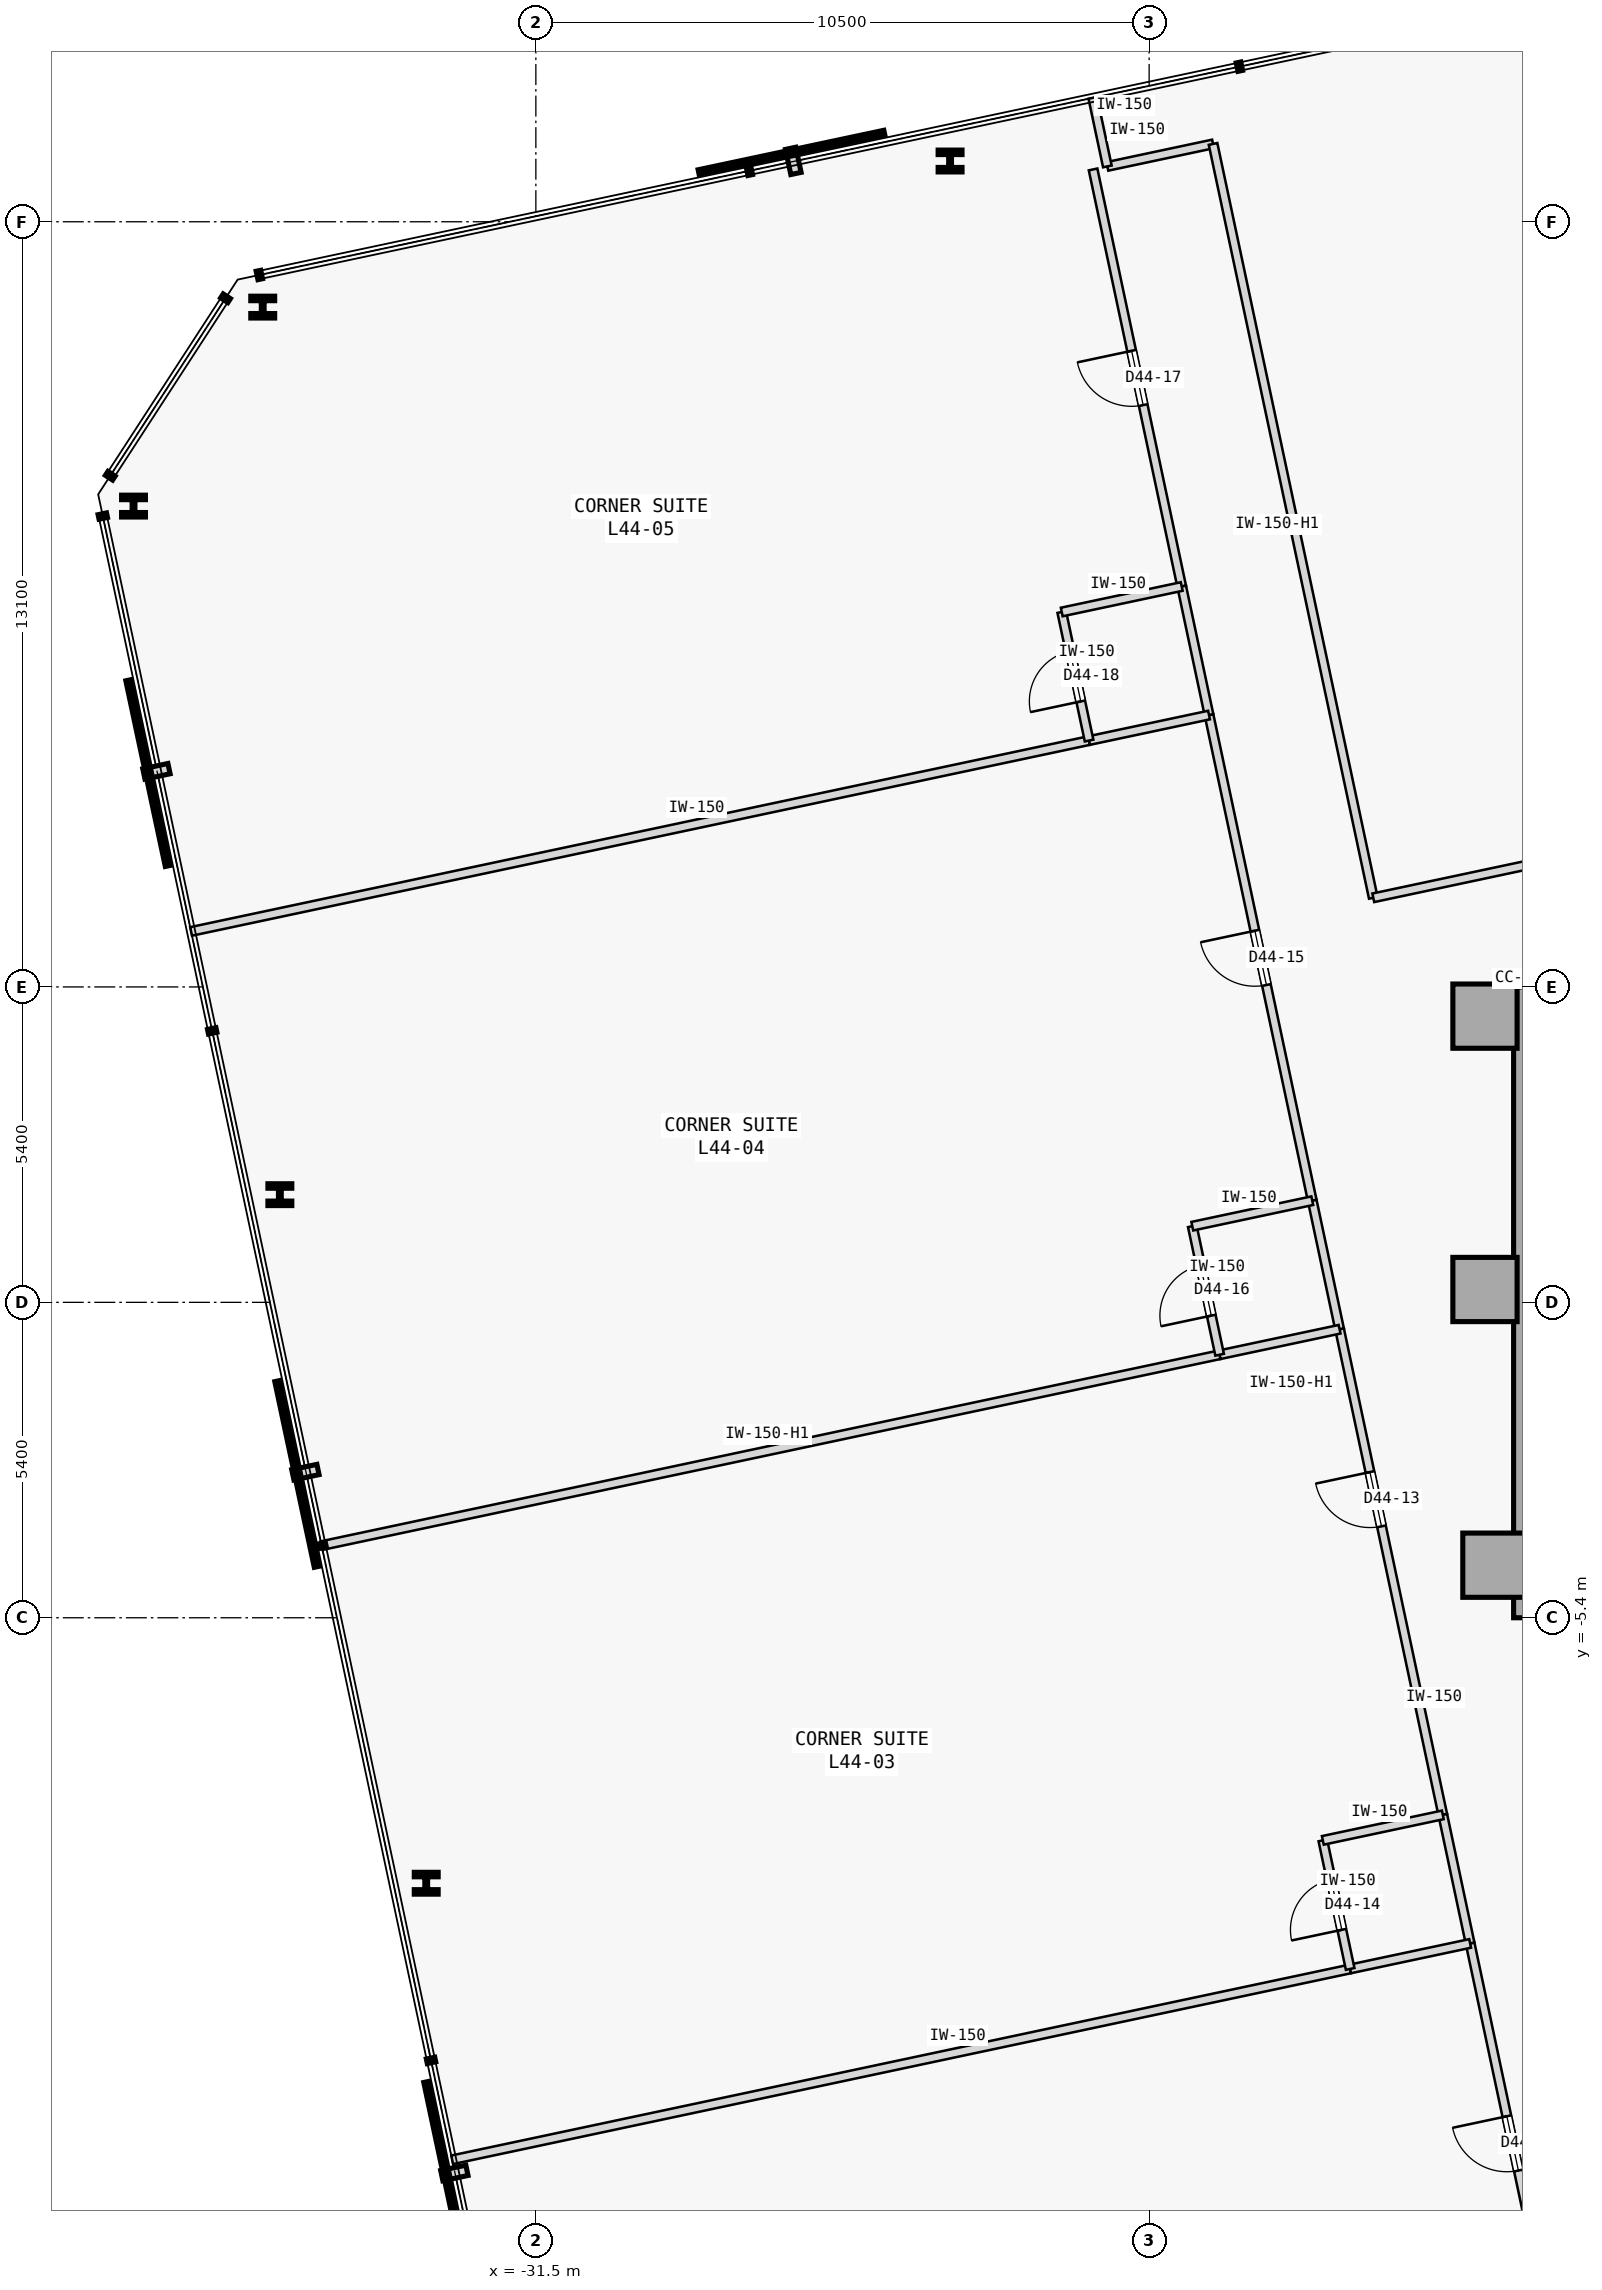
"""IFC4 building model, lengths in metres.
Left out: names, types, materials, properties, quantities, classifications, styles, units other than length and angle.
Written with IfcOpenShell. Run it as: python <this file> out.ifc"""

import sys

from ifc_helpers import new_model, si_unit, direction, frame, frame_2d, origin, origin_2d, place, context, subcontext, project, spatial, rectangle, i_section, extrude, element, fill, save


model = new_model("IFC4")
c1 = context("Model", 3, precision=1e-05, world=origin(), true_north=direction((0.0, 1.0)))
c2 = subcontext(c1, "Body", "Model", "MODEL_VIEW")
j1 = project(units=[si_unit("LENGTHUNIT", "METRE"), si_unit("PLANEANGLEUNIT", "RADIAN")], contexts=[c1])
p1 = place(None, origin())
s1 = spatial("IfcSite", under=j1, at=p1, CompositionType="ELEMENT")
p2 = place(p1, origin())
s2 = spatial("IfcBuilding", under=s1, at=p2, CompositionType="ELEMENT")
p3 = place(p2, frame((0.0, 0.0, 171.8)))
s3 = spatial("IfcBuildingStorey", under=s2, at=p3, CompositionType="ELEMENT", Elevation=171.8)
for number, where, z_axis, x_axis in (
    (1, (-15.25, 4.9, 0.0), (0.0, 0.0, 1.0), (1.0, 0.0, 0.0)),
    (2, (-15.25, 0.22, 0.0), (0.0, 0.0, 1.0), (1.0, 0.0, 0.0)),
    (3, (-15.08, -4.5, 0.0), (0.0, 0.0, 1.0), (1.0, 0.0, 0.0)),
):
    element("IfcColumn", number, at=place(p3, frame(where, z_axis=z_axis, x_axis=x_axis)), inside=s3, PredefinedType="COLUMN", context=c2, shape_type="SweptSolid", body=[
        extrude(rectangle(XDim=1.1, YDim=1.1, at=origin_2d()), origin(), (0.0, 0.0, 1.0), 3.4),
    ])
p4 = place(p3, frame((-14.56, -5.4, 0.0), z_axis=(0.0, 0.0, 1.0), x_axis=(0.0, 1.0, 0.0)))
e4 = element("IfcWall", 4, at=p4, inside=s3, PredefinedType="SHEAR", context=c2, shape_type="SweptSolid", body=[
    extrude(rectangle(XDim=10.8, YDim=0.4, at=frame_2d((5.4, 0.0))), origin(), (0.0, 0.0, 1.0), 3.175),
])
for number, where, z_axis, x_axis in (
    (5, (-24.408, 19.54, 0.0), (0.0, 0.0, 1.0), (1.0, 0.0, 0.0)),
    (6, (-36.176, 17.039, 0.0), (0.0, 0.0, 1.0), (1.0, 0.0, 0.0)),
    (7, (-38.389, 13.632, 0.0), (0.0, 0.0, 1.0), (1.0, 0.0, 0.0)),
    (8, (-35.883, 1.844, 0.0), (0.0, 0.0, 1.0), (1.0, 0.0, 0.0)),
    (9, (-33.377, -9.945, 0.0), (0.0, 0.0, 1.0), (1.0, 0.0, 0.0)),
):
    element("IfcColumn", number, at=place(p3, frame(where, z_axis=z_axis, x_axis=x_axis)), inside=s3, PredefinedType="COLUMN", context=c2, shape_type="SweptSolid", body=[
        extrude(i_section(OverallWidth=0.409, OverallDepth=0.374, WebThickness=0.048, FlangeThickness=0.077, FilletRadius=0.015, at=origin_2d()), origin(), (0.0, 0.0, 1.0), 3.4),
    ])
p5 = place(p3, frame((-21.715, 19.448, 0.0), z_axis=(0.0, 0.0, 1.0), x_axis=(0.978160192495, 0.207852442415, 0.0)))
e10 = element("IfcWall", 10, at=p5, inside=s3, PredefinedType="PARTITIONING", context=c2, shape_type="SweptSolid", body=[
    extrude(rectangle(XDim=1.85, YDim=0.15, at=frame_2d((0.925, 0.0))), origin(), (0.0, 0.0, 1.0), 3.175),
])
p6 = place(p3, frame((-17.162, 6.926, 0.0), z_axis=(0.0, 0.0, 1.0), x_axis=(-0.207911421929, 0.978147657888, 0.0)))
e11 = element("IfcWall", 11, at=p6, inside=s3, PredefinedType="PARTITIONING", context=c2, shape_type="SweptSolid", body=[
    extrude(rectangle(XDim=13.195, YDim=0.15, at=frame_2d((6.598, 0.0))), origin(), (0.0, 0.0, 1.0), 2.725),
])
p7 = place(p3, frame((-17.162, 6.926, 0.0), z_axis=(0.0, 0.0, 1.0), x_axis=(0.978145870853, 0.207919829103, 0.0)))
e12 = element("IfcWall", 12, at=p7, inside=s3, PredefinedType="PARTITIONING", context=c2, shape_type="SweptSolid", body=[
    extrude(rectangle(XDim=15.347, YDim=0.15, at=frame_2d((7.673, 0.0))), origin(), (0.0, 0.0, 1.0), 3.175),
])
p8 = place(p7, frame((7.213, 0.0, 0.0)))
e13 = element("IfcOpeningElement", 13, at=p8, cuts=e12, PredefinedType="OPENING", context=c2, shape_type="SweptSolid", body=[
    extrude(rectangle(XDim=0.92, YDim=2.15, at=frame_2d((0.46, 1.075))), frame((0.0, 0.085, 0.0), z_axis=(0.0, -1.0, 0.0), x_axis=(1.0, 0.0, 0.0)), (0.0, 0.0, 1.0), 0.17),
])
p9 = place(p3, frame((-14.049, -17.823, 0.0), z_axis=(0.0, 0.0, 1.0), x_axis=(-0.207940096132, 0.978141562567, 0.0)))
e14 = element("IfcWall", 14, at=p9, inside=s3, PredefinedType="PARTITIONING", context=c2, shape_type="SweptSolid", body=[
    extrude(rectangle(XDim=7.0, YDim=0.15, at=frame_2d((3.5, 0.0))), origin(), (0.0, 0.0, 1.0), 3.175),
])
p10 = place(p9, frame((3.025, 0.0, 0.0)))
e15 = element("IfcOpeningElement", 15, at=p10, cuts=e14, PredefinedType="OPENING", context=c2, shape_type="SweptSolid", body=[
    extrude(rectangle(XDim=0.95, YDim=2.15, at=frame_2d((0.475, 1.075))), frame((0.0, 0.085, 0.0), z_axis=(0.0, -1.0, 0.0), x_axis=(1.0, 0.0, 0.0)), (0.0, 0.0, 1.0), 0.17),
])
p11 = place(p3, frame((-15.972, -8.775, 0.0), z_axis=(0.0, 0.0, 1.0), x_axis=(-0.207894825434, 0.97815118543, 0.0)))
e16 = element("IfcWall", 16, at=p11, inside=s3, PredefinedType="PARTITIONING", context=c2, shape_type="SweptSolid", body=[
    extrude(rectangle(XDim=8.5, YDim=0.15, at=frame_2d((4.25, 0.0))), origin(), (0.0, 0.0, 1.0), 3.175),
])
p12 = place(p11, frame((5.05, 0.0, 0.0)))
e17 = element("IfcOpeningElement", 17, at=p12, cuts=e16, PredefinedType="OPENING", context=c2, shape_type="SweptSolid", body=[
    extrude(rectangle(XDim=0.95, YDim=2.15, at=frame_2d((0.475, 1.075))), frame((0.0, 0.085, 0.0), z_axis=(0.0, -1.0, 0.0), x_axis=(1.0, 0.0, 0.0)), (0.0, 0.0, 1.0), 0.17),
])
p13 = place(p3, frame((-15.504, -10.976, 0.0), z_axis=(0.0, 0.0, 1.0), x_axis=(-0.207891197838, 0.978151956427, 0.0)))
e18 = element("IfcWall", 18, at=p13, inside=s3, PredefinedType="PARTITIONING", context=c2, shape_type="SweptSolid", body=[
    extrude(rectangle(XDim=2.25, YDim=0.15, at=frame_2d((1.125, 0.0))), origin(), (0.0, 0.0, 1.0), 3.175),
])
p14 = place(p3, frame((-18.207, 1.74, 0.0), z_axis=(0.0, 0.0, 1.0), x_axis=(-0.207922306475, 0.978145344246, 0.0)))
e19 = element("IfcWall", 19, at=p14, inside=s3, PredefinedType="PARTITIONING", context=c2, shape_type="SweptSolid", body=[
    extrude(rectangle(XDim=8.5, YDim=0.15, at=frame_2d((4.25, 0.0))), origin(), (0.0, 0.0, 1.0), 3.175),
])
p15 = place(p14, frame((3.775, 0.0, 0.0)))
e20 = element("IfcOpeningElement", 20, at=p15, cuts=e19, PredefinedType="OPENING", context=c2, shape_type="SweptSolid", body=[
    extrude(rectangle(XDim=0.95, YDim=2.15, at=frame_2d((0.475, 1.075))), frame((0.0, 0.085, 0.0), z_axis=(0.0, -1.0, 0.0), x_axis=(1.0, 0.0, 0.0)), (0.0, 0.0, 1.0), 0.17),
])
p16 = place(p3, frame((-17.739, -0.46, 0.0), z_axis=(0.0, 0.0, 1.0), x_axis=(-0.207891197838, 0.978151956427, 0.0)))
e21 = element("IfcWall", 21, at=p16, inside=s3, PredefinedType="PARTITIONING", context=c2, shape_type="SweptSolid", body=[
    extrude(rectangle(XDim=2.25, YDim=0.15, at=frame_2d((1.125, 0.0))), origin(), (0.0, 0.0, 1.0), 3.175),
])
p17 = place(p3, frame((-20.442, 12.255, 0.0), z_axis=(0.0, 0.0, 1.0), x_axis=(-0.207916352354, 0.978146609882, 0.0)))
e22 = element("IfcWall", 22, at=p17, inside=s3, PredefinedType="PARTITIONING", context=c2, shape_type="SweptSolid", body=[
    extrude(rectangle(XDim=7.3, YDim=0.15, at=frame_2d((3.65, 0.0))), origin(), (0.0, 0.0, 1.0), 3.175),
])
p18 = place(p17, frame((3.175, 0.0, 0.0)))
e23 = element("IfcOpeningElement", 23, at=p18, cuts=e22, PredefinedType="OPENING", context=c2, shape_type="SweptSolid", body=[
    extrude(rectangle(XDim=0.95, YDim=2.15, at=frame_2d((0.475, 1.075))), frame((0.0, 0.085, 0.0), z_axis=(0.0, -1.0, 0.0), x_axis=(1.0, 0.0, 0.0)), (0.0, 0.0, 1.0), 0.17),
])
p19 = place(p3, frame((-19.974, 10.055, 0.0), z_axis=(0.0, 0.0, 1.0), x_axis=(-0.207913264065, 0.978147266328, 0.0)))
e24 = element("IfcWall", 24, at=p19, inside=s3, PredefinedType="PARTITIONING", context=c2, shape_type="SweptSolid", body=[
    extrude(rectangle(XDim=2.25, YDim=0.15, at=frame_2d((1.125, 0.0))), origin(), (0.0, 0.0, 1.0), 3.175),
])
p20 = place(p3, frame((-21.715, 19.448, 0.0), z_axis=(0.0, 0.0, 1.0), x_axis=(-0.20795853359, 0.978137642823, 0.0)))
e25 = element("IfcWall", 25, at=p20, inside=s3, PredefinedType="PARTITIONING", context=c2, shape_type="SweptSolid", body=[
    extrude(rectangle(XDim=1.2, YDim=0.15, at=frame_2d((0.6, 0.0))), origin(), (0.0, 0.0, 1.0), 3.175),
])
p21 = place(p3, frame((-32.933, -14.68, 0.0), z_axis=(0.0, 0.0, 1.0), x_axis=(0.978146137903, 0.207918572776, 0.0)))
e26 = element("IfcWall", 26, at=p21, inside=s3, PredefinedType="PARTITIONING", context=c2, shape_type="SweptSolid", body=[
    extrude(rectangle(XDim=15.718, YDim=0.15, at=frame_2d((7.859, 0.0))), origin(), (0.0, 0.0, 1.0), 3.175),
])
p22 = place(p3, frame((-17.558, -11.412, 0.0), z_axis=(0.0, 0.0, 1.0), x_axis=(0.978153236239, 0.207885176084, 0.0)))
e27 = element("IfcWall", 27, at=p22, inside=s3, PredefinedType="PARTITIONING", context=c2, shape_type="SweptSolid", body=[
    extrude(rectangle(XDim=2.1, YDim=0.15, at=frame_2d((1.05, 0.0))), origin(), (0.0, 0.0, 1.0), 3.175),
])
p23 = place(p3, frame((-17.558, -11.412, 0.0), z_axis=(0.0, 0.0, 1.0), x_axis=(-0.207891197838, 0.978151956427, 0.0)))
e28 = element("IfcWall", 28, at=p23, inside=s3, PredefinedType="PARTITIONING", context=c2, shape_type="SweptSolid", body=[
    extrude(rectangle(XDim=2.25, YDim=0.15, at=frame_2d((1.125, 0.0))), origin(), (0.0, 0.0, 1.0), 3.175),
])
p24 = place(p23, frame((0.685, 0.0, 0.0)))
e29 = element("IfcOpeningElement", 29, at=p24, cuts=e28, PredefinedType="OPENING", context=c2, shape_type="SweptSolid", body=[
    extrude(rectangle(XDim=0.88, YDim=2.15, at=frame_2d((0.44, 1.075))), frame((0.0, 0.085, 0.0), z_axis=(0.0, -1.0, 0.0), x_axis=(1.0, 0.0, 0.0)), (0.0, 0.0, 1.0), 0.17),
])
p25 = place(p3, frame((-18.026, -9.211, 0.0), z_axis=(0.0, 0.0, 1.0), x_axis=(0.978153236239, 0.207885176084, 0.0)))
e30 = element("IfcWall", 30, at=p25, inside=s3, PredefinedType="PARTITIONING", context=c2, shape_type="SweptSolid", body=[
    extrude(rectangle(XDim=2.1, YDim=0.15, at=frame_2d((1.05, 0.0))), origin(), (0.0, 0.0, 1.0), 3.175),
])
p26 = place(p3, frame((-35.168, -4.165, 0.0), z_axis=(0.0, 0.0, 1.0), x_axis=(0.978149296727, 0.207903711638, 0.0)))
e31 = element("IfcWall", 31, at=p26, inside=s3, PredefinedType="PARTITIONING", context=c2, shape_type="SweptSolid", body=[
    extrude(rectangle(XDim=15.718, YDim=0.15, at=frame_2d((7.859, 0.0))), origin(), (0.0, 0.0, 1.0), 2.725),
])
p27 = place(p3, frame((-19.793, -0.897, 0.0), z_axis=(0.0, 0.0, 1.0), x_axis=(0.978134617382, 0.207972763311, 0.0)))
e32 = element("IfcWall", 32, at=p27, inside=s3, PredefinedType="PARTITIONING", context=c2, shape_type="SweptSolid", body=[
    extrude(rectangle(XDim=2.1, YDim=0.15, at=frame_2d((1.05, 0.0))), origin(), (0.0, 0.0, 1.0), 2.725),
])
p28 = place(p3, frame((-19.793, -0.897, 0.0), z_axis=(0.0, 0.0, 1.0), x_axis=(-0.207891197838, 0.978151956427, 0.0)))
e33 = element("IfcWall", 33, at=p28, inside=s3, PredefinedType="PARTITIONING", context=c2, shape_type="SweptSolid", body=[
    extrude(rectangle(XDim=2.25, YDim=0.15, at=frame_2d((1.125, 0.0))), origin(), (0.0, 0.0, 1.0), 3.175),
])
p29 = place(p28, frame((0.685, 0.0, 0.0)))
e34 = element("IfcOpeningElement", 34, at=p29, cuts=e33, PredefinedType="OPENING", context=c2, shape_type="SweptSolid", body=[
    extrude(rectangle(XDim=0.88, YDim=2.15, at=frame_2d((0.44, 1.075))), frame((0.0, 0.085, 0.0), z_axis=(0.0, -1.0, 0.0), x_axis=(1.0, 0.0, 0.0)), (0.0, 0.0, 1.0), 0.17),
])
p30 = place(p3, frame((-20.261, 1.304, 0.0), z_axis=(0.0, 0.0, 1.0), x_axis=(0.978134617382, 0.207972763311, 0.0)))
e35 = element("IfcWall", 35, at=p30, inside=s3, PredefinedType="PARTITIONING", context=c2, shape_type="SweptSolid", body=[
    extrude(rectangle(XDim=2.1, YDim=0.15, at=frame_2d((1.05, 0.0))), origin(), (0.0, 0.0, 1.0), 3.175),
])
p31 = place(p3, frame((-37.403, 6.35, 0.0), z_axis=(0.0, 0.0, 1.0), x_axis=(0.978149296727, 0.207903711638, 0.0)))
e36 = element("IfcWall", 36, at=p31, inside=s3, PredefinedType="PARTITIONING", context=c2, shape_type="SweptSolid", body=[
    extrude(rectangle(XDim=15.718, YDim=0.15, at=frame_2d((7.859, 0.0))), origin(), (0.0, 0.0, 1.0), 3.175),
])
p32 = place(p3, frame((-22.029, 9.618, 0.0), z_axis=(0.0, 0.0, 1.0), x_axis=(0.978134617382, 0.207972763311, 0.0)))
e37 = element("IfcWall", 37, at=p32, inside=s3, PredefinedType="PARTITIONING", context=c2, shape_type="SweptSolid", body=[
    extrude(rectangle(XDim=2.1, YDim=0.15, at=frame_2d((1.05, 0.0))), origin(), (0.0, 0.0, 1.0), 3.175),
])
p33 = place(p3, frame((-22.029, 9.618, 0.0), z_axis=(0.0, 0.0, 1.0), x_axis=(-0.207891197838, 0.978151956427, 0.0)))
e38 = element("IfcWall", 38, at=p33, inside=s3, PredefinedType="PARTITIONING", context=c2, shape_type="SweptSolid", body=[
    extrude(rectangle(XDim=2.25, YDim=0.15, at=frame_2d((1.125, 0.0))), origin(), (0.0, 0.0, 1.0), 3.175),
])
p34 = place(p33, frame((0.685, 0.0, 0.0)))
e39 = element("IfcOpeningElement", 39, at=p34, cuts=e38, PredefinedType="OPENING", context=c2, shape_type="SweptSolid", body=[
    extrude(rectangle(XDim=0.88, YDim=2.15, at=frame_2d((0.44, 1.075))), frame((0.0, 0.085, 0.0), z_axis=(0.0, -1.0, 0.0), x_axis=(1.0, 0.0, 0.0)), (0.0, 0.0, 1.0), 0.17),
])
p35 = place(p3, frame((-22.496, 11.819, 0.0), z_axis=(0.0, 0.0, 1.0), x_axis=(0.97815826, 0.207861536591, 0.0)))
e40 = element("IfcWall", 40, at=p35, inside=s3, PredefinedType="PARTITIONING", context=c2, shape_type="SweptSolid", body=[
    extrude(rectangle(XDim=2.1, YDim=0.15, at=frame_2d((1.05, 0.0))), origin(), (0.0, 0.0, 1.0), 3.175),
])
p36 = place(p10, origin())
e41 = element("IfcDoor", 41, at=p36, inside=s3, OperationType="SINGLE_SWING_RIGHT", PredefinedType="DOOR", context=c2, shape_type="SweptSolid", body=[
    extrude(rectangle(XDim=0.95, YDim=2.15, at=frame_2d((0.475, 1.075))), frame((0.0, 0.025, 0.0), z_axis=(0.0, -1.0, 0.0), x_axis=(1.0, 0.0, 0.0)), (0.0, 0.0, 1.0), 0.05),
])
fill(e15, e41)
p37 = place(p12, origin())
e42 = element("IfcDoor", 42, at=p37, inside=s3, OperationType="SINGLE_SWING_RIGHT", PredefinedType="DOOR", context=c2, shape_type="SweptSolid", body=[
    extrude(rectangle(XDim=0.95, YDim=2.15, at=frame_2d((0.475, 1.075))), frame((0.0, 0.025, 0.0), z_axis=(0.0, -1.0, 0.0), x_axis=(1.0, 0.0, 0.0)), (0.0, 0.0, 1.0), 0.05),
])
fill(e17, e42)
p38 = place(p24, origin())
e43 = element("IfcDoor", 43, at=p38, inside=s3, OperationType="SINGLE_SWING_LEFT", PredefinedType="DOOR", context=c2, shape_type="SweptSolid", body=[
    extrude(rectangle(XDim=0.88, YDim=2.15, at=frame_2d((0.44, 1.075))), frame((0.0, 0.025, 0.0), z_axis=(0.0, -1.0, 0.0), x_axis=(1.0, 0.0, 0.0)), (0.0, 0.0, 1.0), 0.05),
])
fill(e29, e43)
p39 = place(p15, origin())
e44 = element("IfcDoor", 44, at=p39, inside=s3, OperationType="SINGLE_SWING_RIGHT", PredefinedType="DOOR", context=c2, shape_type="SweptSolid", body=[
    extrude(rectangle(XDim=0.95, YDim=2.15, at=frame_2d((0.475, 1.075))), frame((0.0, 0.025, 0.0), z_axis=(0.0, -1.0, 0.0), x_axis=(1.0, 0.0, 0.0)), (0.0, 0.0, 1.0), 0.05),
])
fill(e20, e44)
p40 = place(p29, origin())
e45 = element("IfcDoor", 45, at=p40, inside=s3, OperationType="SINGLE_SWING_LEFT", PredefinedType="DOOR", context=c2, shape_type="SweptSolid", body=[
    extrude(rectangle(XDim=0.88, YDim=2.15, at=frame_2d((0.44, 1.075))), frame((0.0, 0.025, 0.0), z_axis=(0.0, -1.0, 0.0), x_axis=(1.0, 0.0, 0.0)), (0.0, 0.0, 1.0), 0.05),
])
fill(e34, e45)
p41 = place(p18, origin())
e46 = element("IfcDoor", 46, at=p41, inside=s3, OperationType="SINGLE_SWING_RIGHT", PredefinedType="DOOR", context=c2, shape_type="SweptSolid", body=[
    extrude(rectangle(XDim=0.95, YDim=2.15, at=frame_2d((0.475, 1.075))), frame((0.0, 0.025, 0.0), z_axis=(0.0, -1.0, 0.0), x_axis=(1.0, 0.0, 0.0)), (0.0, 0.0, 1.0), 0.05),
])
fill(e23, e46)
p42 = place(p34, origin())
e47 = element("IfcDoor", 47, at=p42, inside=s3, OperationType="SINGLE_SWING_LEFT", PredefinedType="DOOR", context=c2, shape_type="SweptSolid", body=[
    extrude(rectangle(XDim=0.88, YDim=2.15, at=frame_2d((0.44, 1.075))), frame((0.0, 0.025, 0.0), z_axis=(0.0, -1.0, 0.0), x_axis=(1.0, 0.0, 0.0)), (0.0, 0.0, 1.0), 0.05),
])
fill(e39, e47)
save(model, sys.argv[1])
